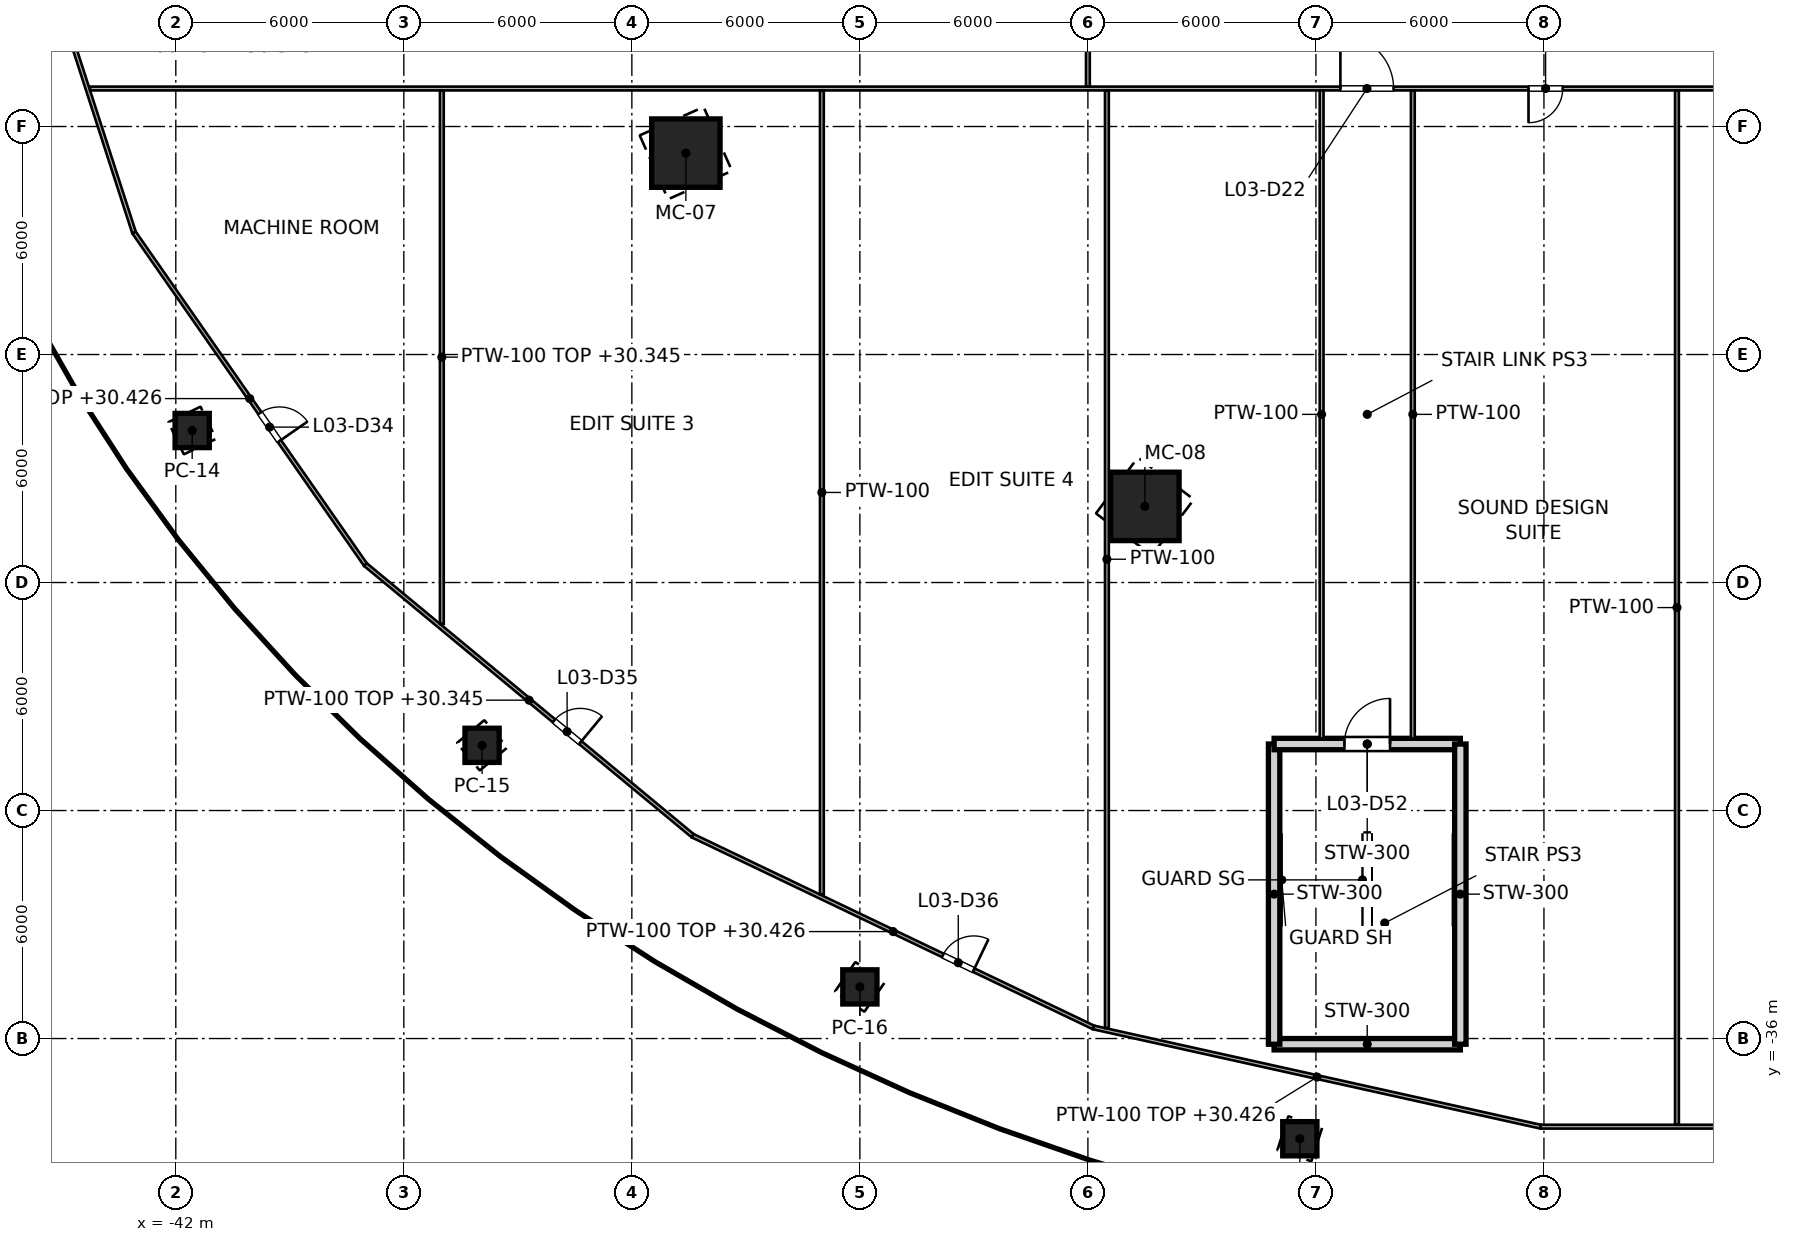
"""IFC4 building model, lengths in metres.
Left out: names, types, materials, properties, quantities, classifications, styles, units other than length and angle.
Written with IfcOpenShell. Run it as: python <this file> out.ifc"""

import sys

from ifc_helpers import new_model, si_unit, direction, frame, frame_2d, origin, origin_2d, place, context, subcontext, project, spatial, rectangle, hollow_rectangle, extrude, element, fill, save


model = new_model("IFC4")
c1 = context("Model", 3, precision=1e-05, world=origin(), true_north=direction((0.0, 1.0)))
c2 = subcontext(c1, "Body", "Model", "MODEL_VIEW")
j1 = project(units=[si_unit("LENGTHUNIT", "METRE"), si_unit("PLANEANGLEUNIT", "RADIAN")], contexts=[c1])
p1 = place(None, origin())
s1 = spatial("IfcSite", under=j1, at=p1, CompositionType="ELEMENT")
p2 = place(p1, origin())
s2 = spatial("IfcBuilding", under=s1, at=p2, CompositionType="ELEMENT")
p3 = place(p2, frame((0.0, 0.0, 26.0)))
s3 = spatial("IfcBuildingStorey", under=s2, at=p3, CompositionType="ELEMENT", Elevation=26.0)
for number, where, z_axis, x_axis in (
    (1, (-28.579, -12.7, 0.0), (0.0, 0.0, 1.0), (-0.914, -0.406, 0.0)),
    (2, (-16.5, -21.997, 0.0), (0.0, 0.0, 1.0), (-0.6, -0.8, 0.0)),
):
    element("IfcColumn", number, at=place(p3, frame(where, z_axis=z_axis, x_axis=x_axis)), inside=s3, PredefinedType="COLUMN", context=c2, shape_type="SweptSolid", body=[
        extrude(hollow_rectangle(XDim=1.8, YDim=1.8, WallThickness=0.08, at=origin_2d()), origin(), (0.0, 0.0, 1.0), 5.4),
    ])
for number, where, z_axis, x_axis in (
    (3, (-41.569, -20.0, 0.0), (0.0, 0.0, 1.0), (-0.901, -0.434, 0.0)),
    (4, (-33.941, -28.284, 0.0), (0.0, 0.0, 1.0), (-0.768, -0.64, 0.0)),
    (5, (-24.0, -34.641, 0.0), (0.0, 0.0, 1.0), (-0.569, -0.822, 0.0)),
    (6, (-12.423, -38.637, 0.0), (0.0, 0.0, 1.0), (-0.306, -0.952, 0.0)),
):
    element("IfcColumn", number, at=place(p3, frame(where, z_axis=z_axis, x_axis=x_axis)), inside=s3, PredefinedType="COLUMN", context=c2, shape_type="SweptSolid", body=[
        extrude(hollow_rectangle(XDim=0.9, YDim=0.9, WallThickness=0.04, at=origin_2d()), origin(), (0.0, 0.0, 1.0), 5.4),
    ])
p4 = place(p3, frame((-8.2, -36.15, 0.0), z_axis=(0.0, 0.0, 1.0), x_axis=(-1.0, 0.0, 0.0)))
e7 = element("IfcWall", 7, at=p4, inside=s3, PredefinedType="SOLIDWALL", context=c2, shape_type="SweptSolid", body=[
    extrude(rectangle(XDim=4.9, YDim=0.3, at=frame_2d((2.45, 0.0))), origin(), (0.0, 0.0, 1.0), 5.2),
])
p5 = place(p3, frame((-13.1, -36.15, 0.0), z_axis=(0.0, 0.0, 1.0), x_axis=(0.0, 1.0, 0.0)))
e8 = element("IfcWall", 8, at=p5, inside=s3, PredefinedType="SOLIDWALL", context=c2, shape_type="SweptSolid", body=[
    extrude(rectangle(XDim=7.9, YDim=0.3, at=frame_2d((3.95, 0.0))), origin(), (0.0, 0.0, 1.0), 5.2),
])
p6 = place(p3, frame((-13.1, -28.25, 0.0), z_axis=(0.0, 0.0, 1.0), x_axis=(1.0, 0.0, 0.0)))
e9 = element("IfcWall", 9, at=p6, inside=s3, PredefinedType="SOLIDWALL", context=c2, shape_type="SweptSolid", body=[
    extrude(rectangle(XDim=4.9, YDim=0.3, at=frame_2d((2.45, 0.0))), origin(), (0.0, 0.0, 1.0), 5.2),
])
p7 = place(p6, frame((1.85, 0.0, 0.0)))
e10 = element("IfcOpeningElement", 10, at=p7, cuts=e9, PredefinedType="OPENING", context=c2, shape_type="SweptSolid", body=[
    extrude(rectangle(XDim=1.2, YDim=2.1, at=frame_2d((0.6, 1.05))), frame((0.0, 0.15, 0.0), z_axis=(0.0, -1.0, 0.0), x_axis=(1.0, 0.0, 0.0)), (0.0, 0.0, 1.0), 0.3),
])
p8 = place(p3, frame((-8.2, -28.25, 0.0), z_axis=(0.0, 0.0, 1.0), x_axis=(0.0, -1.0, 0.0)))
e11 = element("IfcWall", 11, at=p8, inside=s3, PredefinedType="SOLIDWALL", context=c2, shape_type="SweptSolid", body=[
    extrude(rectangle(XDim=7.9, YDim=0.3, at=frame_2d((3.95, 0.0))), origin(), (0.0, 0.0, 1.0), 5.2),
])
p9 = place(p3, frame((-46.251, -5.045, 0.0), z_axis=(0.0, 0.0, 1.0), x_axis=(0.307713034182, -0.951479210805, 0.0)))
e12 = element("IfcWall", 12, at=p9, inside=s3, PredefinedType="PARTITIONING", context=c2, shape_type="SweptSolid", body=[
    extrude(rectangle(XDim=10.243, YDim=0.1, at=frame_2d((5.122, 0.0))), origin(), (0.0, 0.0, 1.0), 4.345),
])
p10 = place(p3, frame((-43.099, -14.791, 0.0), z_axis=(0.0, 0.0, 1.0), x_axis=(0.571737958261, -0.820436290692, 0.0)))
e13 = element("IfcWall", 13, at=p10, inside=s3, PredefinedType="PARTITIONING", context=c2, shape_type="SweptSolid", body=[
    extrude(rectangle(XDim=10.65, YDim=0.1, at=frame_2d((5.325, 0.0))), origin(), (0.0, 0.0, 1.0), 4.426),
])
p11 = place(p10, frame((5.79, 0.0, 0.0)))
e14 = element("IfcOpeningElement", 14, at=p11, cuts=e13, PredefinedType="OPENING", context=c2, shape_type="SweptSolid", body=[
    extrude(rectangle(XDim=0.9, YDim=2.1, at=frame_2d((0.45, 1.05))), frame((0.0, 0.05, 0.0), z_axis=(0.0, -1.0, 0.0), x_axis=(1.0, 0.0, 0.0)), (0.0, 0.0, 1.0), 0.1),
])
p12 = place(p3, frame((-37.01, -23.529, 0.0), z_axis=(0.0, 0.0, 1.0), x_axis=(0.770046995363, -0.637987166746, 0.0)))
e15 = element("IfcWall", 15, at=p12, inside=s3, PredefinedType="PARTITIONING", context=c2, shape_type="SweptSolid", body=[
    extrude(rectangle(XDim=11.183, YDim=0.1, at=frame_2d((5.591, 0.0))), origin(), (0.0, 0.0, 1.0), 4.345),
])
p13 = place(p12, frame((6.441, 0.0, 0.0)))
e16 = element("IfcOpeningElement", 16, at=p13, cuts=e15, PredefinedType="OPENING", context=c2, shape_type="SweptSolid", body=[
    extrude(rectangle(XDim=0.9, YDim=2.1, at=frame_2d((0.45, 1.05))), frame((0.0, 0.05, 0.0), z_axis=(0.0, -1.0, 0.0), x_axis=(1.0, 0.0, 0.0)), (0.0, 0.0, 1.0), 0.1),
])
p14 = place(p3, frame((-28.399, -30.663, 0.0), z_axis=(0.0, 0.0, 1.0), x_axis=(0.902100999032, -0.431524955878, 0.0)))
e17 = element("IfcWall", 17, at=p14, inside=s3, PredefinedType="PARTITIONING", context=c2, shape_type="SweptSolid", body=[
    extrude(rectangle(XDim=11.691, YDim=0.1, at=frame_2d((5.845, 0.0))), origin(), (0.0, 0.0, 1.0), 4.426),
])
p15 = place(p14, frame((7.296, 0.0, 0.0)))
e18 = element("IfcOpeningElement", 18, at=p15, cuts=e17, PredefinedType="OPENING", context=c2, shape_type="SweptSolid", body=[
    extrude(rectangle(XDim=0.9, YDim=2.1, at=frame_2d((0.45, 1.05))), frame((0.0, 0.05, 0.0), z_axis=(0.0, -1.0, 0.0), x_axis=(1.0, 0.0, 0.0)), (0.0, 0.0, 1.0), 0.1),
])
p16 = place(p3, frame((-17.852, -35.708, 0.0), z_axis=(0.0, 0.0, 1.0), x_axis=(0.97623471049, -0.216715920124, 0.0)))
e19 = element("IfcWall", 19, at=p16, inside=s3, PredefinedType="PARTITIONING", context=c2, shape_type="SweptSolid", body=[
    extrude(rectangle(XDim=12.05, YDim=0.1, at=frame_2d((6.025, 0.0))), origin(), (0.0, 0.0, 1.0), 4.426),
])
p17 = place(p3, frame((-6.089, -38.319, 0.0), z_axis=(0.0, 0.0, 1.0), x_axis=(1.0, 0.0, 0.0)))
e20 = element("IfcWall", 20, at=p17, inside=s3, PredefinedType="PARTITIONING", context=c2, shape_type="SweptSolid", body=[
    extrude(rectangle(XDim=12.178, YDim=0.1, at=frame_2d((6.089, 0.0))), origin(), (0.0, 0.0, 1.0), 4.426),
])
p18 = place(p3, frame((-44.256, -11.0, 0.0), z_axis=(0.0, 0.0, 1.0), x_axis=(1.0, 0.0, 0.0)))
e21 = element("IfcWall", 21, at=p18, inside=s3, PredefinedType="PARTITIONING", context=c2, shape_type="SweptSolid", body=[
    extrude(rectangle(XDim=88.512, YDim=0.1, at=frame_2d((44.256, 0.0))), origin(), (0.0, 0.0, 1.0), 4.268),
])
p19 = place(p18, frame((32.9, 0.0, 0.0)))
e22 = element("IfcOpeningElement", 22, at=p19, cuts=e21, PredefinedType="OPENING", context=c2, shape_type="SweptSolid", body=[
    extrude(rectangle(XDim=1.4, YDim=2.1, at=frame_2d((0.7, 1.05))), frame((0.0, 0.05, 0.0), z_axis=(0.0, -1.0, 0.0), x_axis=(1.0, 0.0, 0.0)), (0.0, 0.0, 1.0), 0.1),
])
p20 = place(p18, frame((54.2, 0.0, 0.0)))
e23 = element("IfcOpeningElement", 23, at=p20, cuts=e21, PredefinedType="OPENING", context=c2, shape_type="SweptSolid", body=[
    extrude(rectangle(XDim=1.4, YDim=2.1, at=frame_2d((0.7, 1.05))), frame((0.0, 0.05, 0.0), z_axis=(0.0, -1.0, 0.0), x_axis=(1.0, 0.0, 0.0)), (0.0, 0.0, 1.0), 0.1),
])
p21 = place(p18, frame((37.85, 0.0, 0.0)))
e24 = element("IfcOpeningElement", 24, at=p21, cuts=e21, PredefinedType="OPENING", context=c2, shape_type="SweptSolid", body=[
    extrude(rectangle(XDim=0.9, YDim=2.1, at=frame_2d((0.45, 1.05))), frame((0.0, 0.05, 0.0), z_axis=(0.0, -1.0, 0.0), x_axis=(1.0, 0.0, 0.0)), (0.0, 0.0, 1.0), 0.1),
])
p22 = place(p18, frame((47.3, 0.0, 0.0)))
e25 = element("IfcOpeningElement", 25, at=p22, cuts=e21, PredefinedType="OPENING", context=c2, shape_type="SweptSolid", body=[
    extrude(rectangle(XDim=0.9, YDim=2.1, at=frame_2d((0.45, 1.05))), frame((0.0, 0.05, 0.0), z_axis=(0.0, -1.0, 0.0), x_axis=(1.0, 0.0, 0.0)), (0.0, 0.0, 1.0), 0.1),
])
p23 = place(p3, frame((-18.0, -10.95, 0.0), z_axis=(0.0, 0.0, 1.0), x_axis=(0.0, 1.0, 0.0)))
e26 = element("IfcWall", 26, at=p23, inside=s3, PredefinedType="PARTITIONING", context=c2, shape_type="SweptSolid", body=[
    extrude(rectangle(XDim=21.9, YDim=0.1, at=frame_2d((10.95, 0.0))), origin(), (0.0, 0.0, 1.0), 4.277),
])
p24 = place(p23, frame((19.3, 0.0, 0.0)))
e27 = element("IfcOpeningElement", 27, at=p24, cuts=e26, PredefinedType="OPENING", context=c2, shape_type="SweptSolid", body=[
    extrude(rectangle(XDim=1.8, YDim=2.1, at=frame_2d((0.9, 1.05))), frame((0.0, 0.05, 0.0), z_axis=(0.0, -1.0, 0.0), x_axis=(1.0, 0.0, 0.0)), (0.0, 0.0, 1.0), 0.1),
])
p25 = place(p23, frame((5.85, 0.0, 0.0)))
e28 = element("IfcOpeningElement", 28, at=p25, cuts=e26, PredefinedType="OPENING", context=c2, shape_type="SweptSolid", body=[
    extrude(rectangle(XDim=0.9, YDim=2.1, at=frame_2d((0.45, 1.05))), frame((0.0, 0.05, 0.0), z_axis=(0.0, -1.0, 0.0), x_axis=(1.0, 0.0, 0.0)), (0.0, 0.0, 1.0), 0.1),
])
p26 = place(p23, frame((10.45, 0.0, 0.0)))
e29 = element("IfcOpeningElement", 29, at=p26, cuts=e26, PredefinedType="OPENING", context=c2, shape_type="SweptSolid", body=[
    extrude(rectangle(XDim=0.9, YDim=2.1, at=frame_2d((0.45, 1.05))), frame((0.0, 0.05, 0.0), z_axis=(0.0, -1.0, 0.0), x_axis=(1.0, 0.0, 0.0)), (0.0, 0.0, 1.0), 0.1),
])
p27 = place(p23, frame((15.05, 0.0, 0.0)))
e30 = element("IfcOpeningElement", 30, at=p27, cuts=e26, PredefinedType="OPENING", context=c2, shape_type="SweptSolid", body=[
    extrude(rectangle(XDim=0.9, YDim=2.1, at=frame_2d((0.45, 1.05))), frame((0.0, 0.05, 0.0), z_axis=(0.0, -1.0, 0.0), x_axis=(1.0, 0.0, 0.0)), (0.0, 0.0, 1.0), 0.1),
])
p28 = place(p3, frame((-35.0, -11.05, 0.0), z_axis=(0.0, 0.0, 1.0), x_axis=(0.0, -1.0, 0.0)))
e31 = element("IfcWall", 31, at=p28, inside=s3, PredefinedType="PARTITIONING", context=c2, shape_type="SweptSolid", body=[
    extrude(rectangle(XDim=14.037, YDim=0.1, at=frame_2d((7.019, 0.0))), origin(), (0.0, 0.0, 1.0), 4.345),
])
p29 = place(p3, frame((-25.0, -11.05, 0.0), z_axis=(0.0, 0.0, 1.0), x_axis=(0.0, -1.0, 0.0)))
e32 = element("IfcWall", 32, at=p29, inside=s3, PredefinedType="PARTITIONING", context=c2, shape_type="SweptSolid", body=[
    extrude(rectangle(XDim=21.159, YDim=0.1, at=frame_2d((10.58, 0.0))), origin(), (0.0, 0.0, 1.0), 4.268),
])
p30 = place(p3, frame((-17.5, -11.05, 0.0), z_axis=(0.0, 0.0, 1.0), x_axis=(0.0, -1.0, 0.0)))
e33 = element("IfcWall", 33, at=p30, inside=s3, PredefinedType="PARTITIONING", context=c2, shape_type="SweptSolid", body=[
    extrude(rectangle(XDim=24.674, YDim=0.1, at=frame_2d((12.337, 0.0))), origin(), (0.0, 0.0, 1.0), 4.268),
])
p31 = place(p3, frame((-2.5, -11.05, 0.0), z_axis=(0.0, 0.0, 1.0), x_axis=(0.0, -1.0, 0.0)))
e34 = element("IfcWall", 34, at=p31, inside=s3, PredefinedType="PARTITIONING", context=c2, shape_type="SweptSolid", body=[
    extrude(rectangle(XDim=27.219, YDim=0.1, at=frame_2d((13.61, 0.0))), origin(), (0.0, 0.0, 1.0), 4.268),
])
for number, where, z_axis, x_axis in (
    (35, (-11.85, -11.05, 0.0), (0.0, 0.0, 1.0), (0.0, -1.0, 0.0)),
    (36, (-9.45, -11.05, 0.0), (0.0, 0.0, 1.0), (0.0, -1.0, 0.0)),
):
    element("IfcWall", number, at=place(p3, frame(where, z_axis=z_axis, x_axis=x_axis)), inside=s3, PredefinedType="PARTITIONING", context=c2, shape_type="SweptSolid", body=[
        extrude(rectangle(XDim=17.05, YDim=0.1, at=frame_2d((8.525, 0.0))), origin(), (0.0, 0.0, 1.0), 4.268),
    ])
p32 = place(p19, origin())
e37 = element("IfcDoor", 37, at=p32, inside=s3, OperationType="SINGLE_SWING_LEFT", PredefinedType="DOOR", context=c2, shape_type="SweptSolid", body=[
    extrude(rectangle(XDim=1.4, YDim=2.1, at=frame_2d((0.7, 1.05))), frame((0.0, 0.025, 0.0), z_axis=(0.0, -1.0, 0.0), x_axis=(1.0, 0.0, 0.0)), (0.0, 0.0, 1.0), 0.05),
])
fill(e22, e37)
p33 = place(p11, origin())
e38 = element("IfcDoor", 38, at=p33, inside=s3, OperationType="SINGLE_SWING_RIGHT", PredefinedType="DOOR", context=c2, shape_type="SweptSolid", body=[
    extrude(rectangle(XDim=0.9, YDim=2.1, at=frame_2d((0.45, 1.05))), frame((0.0, 0.025, 0.0), z_axis=(0.0, -1.0, 0.0), x_axis=(1.0, 0.0, 0.0)), (0.0, 0.0, 1.0), 0.05),
])
fill(e14, e38)
p34 = place(p13, origin())
e39 = element("IfcDoor", 39, at=p34, inside=s3, OperationType="SINGLE_SWING_RIGHT", PredefinedType="DOOR", context=c2, shape_type="SweptSolid", body=[
    extrude(rectangle(XDim=0.9, YDim=2.1, at=frame_2d((0.45, 1.05))), frame((0.0, 0.025, 0.0), z_axis=(0.0, -1.0, 0.0), x_axis=(1.0, 0.0, 0.0)), (0.0, 0.0, 1.0), 0.05),
])
fill(e16, e39)
p35 = place(p15, origin())
e40 = element("IfcDoor", 40, at=p35, inside=s3, OperationType="SINGLE_SWING_RIGHT", PredefinedType="DOOR", context=c2, shape_type="SweptSolid", body=[
    extrude(rectangle(XDim=0.9, YDim=2.1, at=frame_2d((0.45, 1.05))), frame((0.0, 0.025, 0.0), z_axis=(0.0, -1.0, 0.0), x_axis=(1.0, 0.0, 0.0)), (0.0, 0.0, 1.0), 0.05),
])
fill(e18, e40)
p36 = place(p21, origin())
e41 = element("IfcDoor", 41, at=p36, inside=s3, OperationType="SINGLE_SWING_LEFT", PredefinedType="DOOR", context=c2, shape_type="SweptSolid", body=[
    extrude(rectangle(XDim=0.9, YDim=2.1, at=frame_2d((0.45, 1.05))), frame((0.0, 0.025, 0.0), z_axis=(0.0, -1.0, 0.0), x_axis=(1.0, 0.0, 0.0)), (0.0, 0.0, 1.0), 0.05),
])
fill(e24, e41)
p37 = place(p7, origin())
e42 = element("IfcDoor", 42, at=p37, inside=s3, OperationType="SINGLE_SWING_RIGHT", PredefinedType="DOOR", context=c2, shape_type="SweptSolid", body=[
    extrude(rectangle(XDim=1.2, YDim=2.1, at=frame_2d((0.6, 1.05))), frame((0.0, 0.025, 0.0), z_axis=(0.0, -1.0, 0.0), x_axis=(1.0, 0.0, 0.0)), (0.0, 0.0, 1.0), 0.05),
])
fill(e10, e42)
save(model, sys.argv[1])
